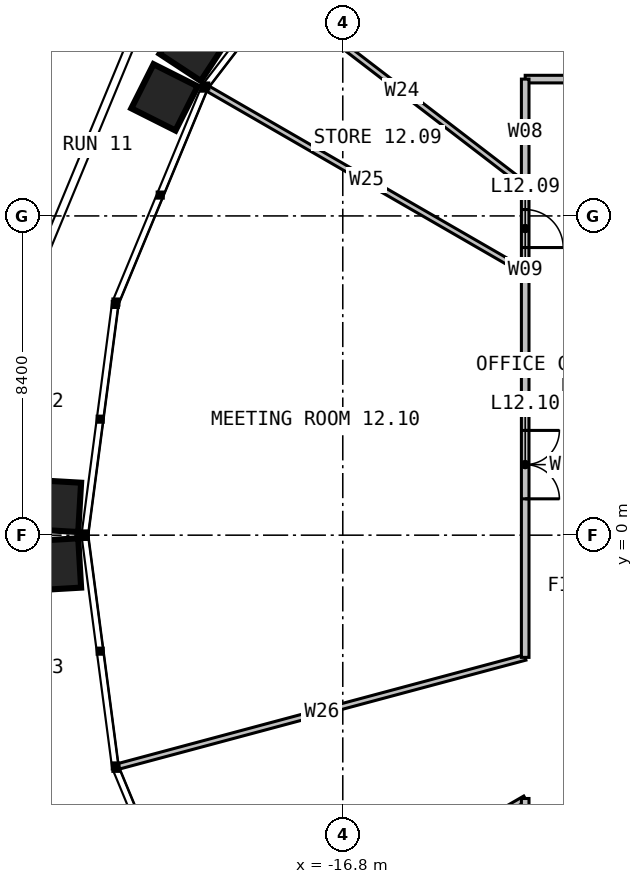
"""IFC4 building model, lengths in metres.
Left out: names, types, materials, properties, quantities, classifications, styles, units other than length and angle.
Written with IfcOpenShell. Run it as: python <this file> out.ifc"""

import sys

from ifc_helpers import new_model, si_unit, direction, frame, frame_2d, origin, place, context, subcontext, project, spatial, rectangle, extrude, element, fill, save


model = new_model("IFC4")
c1 = context("Model", 3, precision=1e-05, world=origin(), true_north=direction((0.0, 1.0)))
c2 = subcontext(c1, "Body", "Model", "MODEL_VIEW")
j1 = project(units=[si_unit("LENGTHUNIT", "METRE"), si_unit("PLANEANGLEUNIT", "RADIAN")], contexts=[c1])
p1 = place(None, origin())
s1 = spatial("IfcSite", under=j1, at=p1, CompositionType="ELEMENT")
p2 = place(p1, origin())
s2 = spatial("IfcBuilding", under=s1, at=p2, CompositionType="ELEMENT")
p3 = place(p2, frame((0.0, 0.0, 53.0)))
s3 = spatial("IfcBuildingStorey", under=s2, at=p3, CompositionType="ELEMENT", Elevation=53.0)
p4 = place(p3, frame((-6.928, 12.0, 0.0), z_axis=(0.0, 0.0, 1.0), x_axis=(-0.499991431567, 0.866030350715, 0.0)))
e1 = element("IfcWall", 1, at=p4, inside=s3, PredefinedType="PARTITIONING", context=c2, shape_type="SweptSolid", body=[
    extrude(rectangle(XDim=9.638, YDim=0.15, at=frame_2d((4.819, 0.0))), origin(), (0.0, 0.0, 1.0), 2.79),
])
p5 = place(p3, frame((-12.0, 9.208, 0.0), z_axis=(0.0, 0.0, 1.0), x_axis=(-0.793362371633, 0.608749658954, 0.0)))
e2 = element("IfcWall", 2, at=p5, inside=s3, PredefinedType="PARTITIONING", context=c2, shape_type="SweptSolid", body=[
    extrude(rectangle(XDim=8.167, YDim=0.15, at=frame_2d((4.084, 0.0))), origin(), (0.0, 0.0, 1.0), 2.79),
])
p6 = place(p3, frame((-12.0, 6.928, 0.0), z_axis=(0.0, 0.0, 1.0), x_axis=(-0.866030350715, 0.499991431567, 0.0)))
e3 = element("IfcWall", 3, at=p6, inside=s3, PredefinedType="PARTITIONING", context=c2, shape_type="SweptSolid", body=[
    extrude(rectangle(XDim=9.638, YDim=0.15, at=frame_2d((4.819, 0.0))), origin(), (0.0, 0.0, 1.0), 2.79),
])
p7 = place(p3, frame((-12.0, -3.215, 0.0), z_axis=(0.0, 0.0, 1.0), x_axis=(-0.965922753078, -0.258830514209, 0.0)))
e4 = element("IfcWall", 4, at=p7, inside=s3, PredefinedType="PARTITIONING", context=c2, shape_type="SweptSolid", body=[
    extrude(rectangle(XDim=11.071, YDim=0.15, at=frame_2d((5.535, 0.0))), origin(), (0.0, 0.0, 1.0), 2.79),
])
p8 = place(p3, frame((-12.0, -6.928, 0.0), z_axis=(0.0, 0.0, 1.0), x_axis=(-0.866030350715, -0.499991431567, 0.0)))
e5 = element("IfcWall", 5, at=p8, inside=s3, PredefinedType="PARTITIONING", context=c2, shape_type="SweptSolid", body=[
    extrude(rectangle(XDim=9.638, YDim=0.15, at=frame_2d((4.819, 0.0))), origin(), (0.0, 0.0, 1.0), 2.79),
])
p9 = place(p3, frame((-6.928, 12.0, 0.0), z_axis=(0.0, 0.0, 1.0), x_axis=(-1.0, 0.0, 0.0)))
e6 = element("IfcWall", 6, at=p9, inside=s3, PredefinedType="PARTITIONING", context=c2, shape_type="SweptSolid", body=[
    extrude(rectangle(XDim=5.072, YDim=0.2, at=frame_2d((2.536, 0.0))), origin(), (0.0, 0.0, 1.0), 3.8),
])
p10 = place(p9, frame((2.036, 0.0, 0.0)))
e7 = element("IfcOpeningElement", 7, at=p10, cuts=e6, PredefinedType="OPENING", context=c2, shape_type="SweptSolid", body=[
    extrude(rectangle(XDim=1.0, YDim=2.2, at=frame_2d((0.5, 1.1))), frame((0.0, 0.11, 0.0), z_axis=(0.0, -1.0, 0.0), x_axis=(1.0, 0.0, 0.0)), (0.0, 0.0, 1.0), 0.22),
])
p11 = place(p3, frame((-12.0, 12.0, 0.0), z_axis=(0.0, 0.0, 1.0), x_axis=(0.0, -1.0, 0.0)))
e8 = element("IfcWall", 8, at=p11, inside=s3, PredefinedType="PARTITIONING", context=c2, shape_type="SweptSolid", body=[
    extrude(rectangle(XDim=2.792, YDim=0.2, at=frame_2d((1.396, 0.0))), origin(), (0.0, 0.0, 1.0), 3.8),
])
p12 = place(p3, frame((-12.0, 9.208, 0.0), z_axis=(0.0, 0.0, 1.0), x_axis=(0.0, -1.0, 0.0)))
e9 = element("IfcWall", 9, at=p12, inside=s3, PredefinedType="PARTITIONING", context=c2, shape_type="SweptSolid", body=[
    extrude(rectangle(XDim=2.28, YDim=0.2, at=frame_2d((1.14, 0.0))), origin(), (0.0, 0.0, 1.0), 3.8),
])
p13 = place(p12, frame((0.64, 0.0, 0.0)))
e10 = element("IfcOpeningElement", 10, at=p13, cuts=e9, PredefinedType="OPENING", context=c2, shape_type="SweptSolid", body=[
    extrude(rectangle(XDim=1.0, YDim=2.2, at=frame_2d((0.5, 1.1))), frame((0.0, 0.11, 0.0), z_axis=(0.0, -1.0, 0.0), x_axis=(1.0, 0.0, 0.0)), (0.0, 0.0, 1.0), 0.22),
])
p14 = place(p3, frame((-12.0, 6.928, 0.0), z_axis=(0.0, 0.0, 1.0), x_axis=(0.0, -1.0, 0.0)))
e11 = element("IfcWall", 11, at=p14, inside=s3, PredefinedType="PARTITIONING", context=c2, shape_type="SweptSolid", body=[
    extrude(rectangle(XDim=10.144, YDim=0.2, at=frame_2d((5.072, 0.0))), origin(), (0.0, 0.0, 1.0), 3.8),
])
p15 = place(p14, frame((4.172, 0.0, 0.0)))
e12 = element("IfcOpeningElement", 12, at=p15, cuts=e11, PredefinedType="OPENING", context=c2, shape_type="SweptSolid", body=[
    extrude(rectangle(XDim=1.8, YDim=2.2, at=frame_2d((0.9, 1.1))), frame((0.0, 0.11, 0.0), z_axis=(0.0, -1.0, 0.0), x_axis=(1.0, 0.0, 0.0)), (0.0, 0.0, 1.0), 0.22),
])
p16 = place(p3, frame((-12.0, -6.928, 0.0), z_axis=(0.0, 0.0, 1.0), x_axis=(0.0, -1.0, 0.0)))
e13 = element("IfcWall", 13, at=p16, inside=s3, PredefinedType="PARTITIONING", context=c2, shape_type="SweptSolid", body=[
    extrude(rectangle(XDim=5.072, YDim=0.2, at=frame_2d((2.536, 0.0))), origin(), (0.0, 0.0, 1.0), 3.8),
])
p17 = place(p16, frame((2.036, 0.0, 0.0)))
e14 = element("IfcOpeningElement", 14, at=p17, cuts=e13, PredefinedType="OPENING", context=c2, shape_type="SweptSolid", body=[
    extrude(rectangle(XDim=1.0, YDim=2.2, at=frame_2d((0.5, 1.1))), frame((0.0, 0.11, 0.0), z_axis=(0.0, -1.0, 0.0), x_axis=(1.0, 0.0, 0.0)), (0.0, 0.0, 1.0), 0.22),
])
p18 = place(p13, origin())
e15 = element("IfcDoor", 15, at=p18, inside=s3, OperationType="SINGLE_SWING_RIGHT", PredefinedType="DOOR", context=c2, shape_type="SweptSolid", body=[
    extrude(rectangle(XDim=1.0, YDim=2.2, at=frame_2d((0.5, 1.1))), frame((0.0, 0.025, 0.0), z_axis=(0.0, -1.0, 0.0), x_axis=(1.0, 0.0, 0.0)), (0.0, 0.0, 1.0), 0.05),
])
fill(e10, e15)
p19 = place(p15, origin())
e16 = element("IfcDoor", 16, at=p19, inside=s3, OperationType="DOUBLE_DOOR_SINGLE_SWING", PredefinedType="DOOR", context=c2, shape_type="SweptSolid", body=[
    extrude(rectangle(XDim=1.8, YDim=2.2, at=frame_2d((0.9, 1.1))), frame((0.0, 0.025, 0.0), z_axis=(0.0, -1.0, 0.0), x_axis=(1.0, 0.0, 0.0)), (0.0, 0.0, 1.0), 0.05),
])
fill(e12, e16)
save(model, sys.argv[1])
